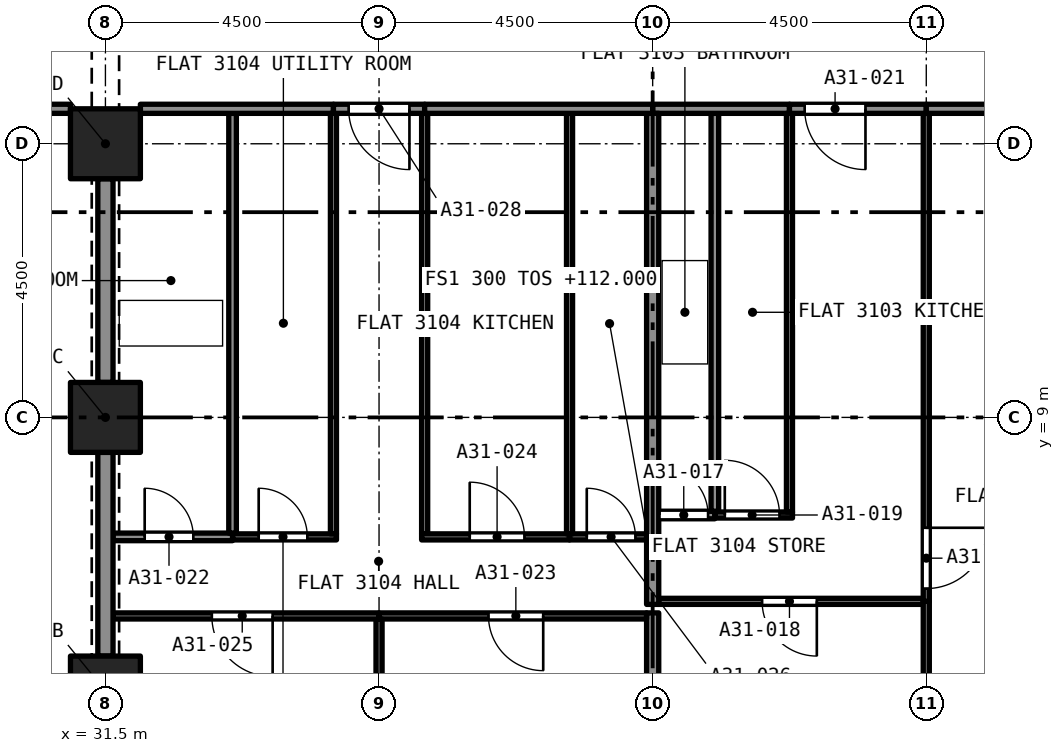
"""IFC4 building model, lengths in metres.
Left out: names, types, materials, properties, quantities, classifications, styles, units other than length and angle.
Written with IfcOpenShell. Run it as: python <this file> out.ifc"""

import sys

from ifc_helpers import new_model, si_unit, direction, frame, frame_2d, origin, origin_2d, place, context, subcontext, project, spatial, rectangle, extrude, element, fill, save


model = new_model("IFC4")
c1 = context("Model", 3, precision=1e-05, world=origin(), true_north=direction((0.0, 1.0)))
c2 = subcontext(c1, "Body", "Model", "MODEL_VIEW")
j1 = project(units=[si_unit("LENGTHUNIT", "METRE"), si_unit("PLANEANGLEUNIT", "RADIAN")], contexts=[c1])
p1 = place(None, origin())
s1 = spatial("IfcSite", under=j1, at=p1, CompositionType="ELEMENT")
p2 = place(p1, origin())
s2 = spatial("IfcBuilding", under=s1, at=p2, CompositionType="ELEMENT")
p3 = place(p2, frame((0.0, 0.0, 112.0)))
s3 = spatial("IfcBuildingStorey", under=s2, at=p3, CompositionType="ELEMENT", Elevation=112.0)
for number, where, z_axis, x_axis in (
    (1, (31.5, 4.5, 0.0), (0.0, 0.0, 1.0), (1.0, 0.0, 0.0)),
    (2, (31.5, 9.0, 0.0), (0.0, 0.0, 1.0), (1.0, 0.0, 0.0)),
    (3, (31.5, 13.5, 0.0), (0.0, 0.0, 1.0), (1.0, 0.0, 0.0)),
):
    element("IfcColumn", number, at=place(p3, frame(where, z_axis=z_axis, x_axis=x_axis)), inside=s3, PredefinedType="COLUMN", context=c2, shape_type="SweptSolid", body=[
        extrude(rectangle(XDim=1.15, YDim=1.15, at=origin_2d()), origin(), (0.0, 0.0, 1.0), 3.2),
    ])
p4 = place(p3, frame((40.6, 7.395, 0.0), z_axis=(0.0, 0.0, 1.0), x_axis=(1.0, 0.0, 0.0)))
e4 = element("IfcWall", 4, at=p4, inside=s3, PredefinedType="PARTITIONING", context=c2, shape_type="SweptSolid", body=[
    extrude(rectangle(XDim=0.923, YDim=0.125, at=frame_2d((0.461, 0.0))), origin(), (0.0, 0.0, 1.0), 2.9),
])
p5 = place(p4, frame((0.011, 0.0, 0.0)))
e5 = element("IfcOpeningElement", 5, at=p5, cuts=e4, PredefinedType="OPENING", context=c2, shape_type="SweptSolid", body=[
    extrude(rectangle(XDim=0.8, YDim=2.1, at=frame_2d((0.4, 1.05))), frame((0.0, 0.073, 0.0), z_axis=(0.0, -1.0, 0.0), x_axis=(1.0, 0.0, 0.0)), (0.0, 0.0, 1.0), 0.145),
])
p6 = place(p3, frame((41.523, 7.458, 0.0), z_axis=(0.0, 0.0, 1.0), x_axis=(0.0, 1.0, 0.0)))
e6 = element("IfcWall", 6, at=p6, inside=s3, PredefinedType="PARTITIONING", context=c2, shape_type="SweptSolid", body=[
    extrude(rectangle(XDim=6.542, YDim=0.125, at=frame_2d((3.271, 0.0))), origin(), (0.0, 0.0, 1.0), 2.9),
])
p7 = place(p3, frame((40.5, 14.075, 0.0), z_axis=(0.0, 0.0, 1.0), x_axis=(1.0, 0.0, 0.0)))
e7 = element("IfcWall", 7, at=p7, inside=s3, PredefinedType="PARTITIONING", context=c2, shape_type="SweptSolid", body=[
    extrude(rectangle(XDim=2.25, YDim=0.15, at=frame_2d((1.125, 0.0))), origin(), (0.0, 0.0, 1.0), 2.9),
])
p8 = place(p3, frame((44.95, 5.975, 0.0), z_axis=(0.0, 0.0, 1.0), x_axis=(-1.0, 0.0, 0.0)))
e8 = element("IfcWall", 8, at=p8, inside=s3, PredefinedType="PARTITIONING", context=c2, shape_type="SweptSolid", body=[
    extrude(rectangle(XDim=4.35, YDim=0.1, at=frame_2d((2.175, 0.0))), origin(), (0.0, 0.0, 1.0), 2.9),
])
p9 = place(p8, frame((1.75, 0.0, 0.0)))
e9 = element("IfcOpeningElement", 9, at=p9, cuts=e8, PredefinedType="OPENING", context=c2, shape_type="SweptSolid", body=[
    extrude(rectangle(XDim=0.9, YDim=2.1, at=frame_2d((0.45, 1.05))), frame((0.0, 0.06, 0.0), z_axis=(0.0, -1.0, 0.0), x_axis=(1.0, 0.0, 0.0)), (0.0, 0.0, 1.0), 0.12),
])
p10 = place(p3, frame((45.0, 0.622, 0.0), z_axis=(0.0, 0.0, 1.0), x_axis=(0.0, 1.0, 0.0)))
e10 = element("IfcWall", 10, at=p10, inside=s3, PredefinedType="PARTITIONING", context=c2, shape_type="SweptSolid", body=[
    extrude(rectangle(XDim=5.353, YDim=0.1, at=frame_2d((2.676, 0.0))), origin(), (0.0, 0.0, 1.0), 2.9),
])
p11 = place(p3, frame((40.5, 0.575, 0.0), z_axis=(0.0, 0.0, 1.0), x_axis=(0.0, 1.0, 0.0)))
e11 = element("IfcWall", 11, at=p11, inside=s3, PredefinedType="PARTITIONING", context=c2, shape_type="SweptSolid", body=[
    extrude(rectangle(XDim=5.21, YDim=0.2, at=frame_2d((2.605, 0.0))), origin(), (0.0, 0.0, 1.0), 2.9),
])
p12 = place(p3, frame((41.523, 7.395, 0.0), z_axis=(0.0, 0.0, 1.0), x_axis=(1.0, 0.0, 0.0)))
e12 = element("IfcWall", 12, at=p12, inside=s3, PredefinedType="PARTITIONING", context=c2, shape_type="SweptSolid", body=[
    extrude(rectangle(XDim=1.277, YDim=0.1, at=frame_2d((0.639, 0.0))), origin(), (0.0, 0.0, 1.0), 2.9),
])
p13 = place(p12, frame((0.164, 0.0, 0.0)))
e13 = element("IfcOpeningElement", 13, at=p13, cuts=e12, PredefinedType="OPENING", context=c2, shape_type="SweptSolid", body=[
    extrude(rectangle(XDim=0.9, YDim=2.1, at=frame_2d((0.45, 1.05))), frame((0.0, 0.06, 0.0), z_axis=(0.0, -1.0, 0.0), x_axis=(1.0, 0.0, 0.0)), (0.0, 0.0, 1.0), 0.12),
])
p14 = place(p3, frame((42.75, 7.445, 0.0), z_axis=(0.0, 0.0, 1.0), x_axis=(0.0, 1.0, 0.0)))
e14 = element("IfcWall", 14, at=p14, inside=s3, PredefinedType="PARTITIONING", context=c2, shape_type="SweptSolid", body=[
    extrude(rectangle(XDim=6.555, YDim=0.1, at=frame_2d((3.277, 0.0))), origin(), (0.0, 0.0, 1.0), 2.9),
])
p15 = place(p3, frame((45.0, 14.0, 0.0), z_axis=(0.0, 0.0, 1.0), x_axis=(0.0, -1.0, 0.0)))
e15 = element("IfcWall", 15, at=p15, inside=s3, PredefinedType="PARTITIONING", context=c2, shape_type="SweptSolid", body=[
    extrude(rectangle(XDim=8.025, YDim=0.1, at=frame_2d((4.012, 0.0))), origin(), (0.0, 0.0, 1.0), 2.9),
])
p16 = place(p15, frame((6.815, 0.0, 0.0)))
e16 = element("IfcOpeningElement", 16, at=p16, cuts=e15, PredefinedType="OPENING", context=c2, shape_type="SweptSolid", body=[
    extrude(rectangle(XDim=1.0, YDim=2.1, at=frame_2d((0.5, 1.05))), frame((0.0, 0.06, 0.0), z_axis=(0.0, -1.0, 0.0), x_axis=(1.0, 0.0, 0.0)), (0.0, 0.0, 1.0), 0.12),
])
p17 = place(p3, frame((40.5, 5.925, 0.0), z_axis=(0.0, 0.0, 1.0), x_axis=(0.0, 1.0, 0.0)))
e17 = element("IfcWall", 17, at=p17, inside=s3, PredefinedType="PARTITIONING", context=c2, shape_type="SweptSolid", body=[
    extrude(rectangle(XDim=8.075, YDim=0.2, at=frame_2d((4.038, 0.0))), origin(), (0.0, 0.0, 1.0), 2.9),
])
p18 = place(p3, frame((45.0, 14.075, 0.0), z_axis=(0.0, 0.0, 1.0), x_axis=(-1.0, 0.0, 0.0)))
e18 = element("IfcWall", 18, at=p18, inside=s3, PredefinedType="PARTITIONING", context=c2, shape_type="SweptSolid", body=[
    extrude(rectangle(XDim=2.25, YDim=0.15, at=frame_2d((1.125, 0.0))), origin(), (0.0, 0.0, 1.0), 2.9),
])
p19 = place(p18, frame((1.0, 0.0, 0.0)))
e19 = element("IfcOpeningElement", 19, at=p19, cuts=e18, PredefinedType="OPENING", context=c2, shape_type="SweptSolid", body=[
    extrude(rectangle(XDim=1.0, YDim=2.1, at=frame_2d((0.5, 1.05))), frame((0.0, 0.085, 0.0), z_axis=(0.0, -1.0, 0.0), x_axis=(1.0, 0.0, 0.0)), (0.0, 0.0, 1.0), 0.17),
])
p20 = place(p3, frame((45.0, 14.075, 0.0), z_axis=(0.0, 0.0, 1.0), x_axis=(1.0, 0.0, 0.0)))
e20 = element("IfcWall", 20, at=p20, inside=s3, PredefinedType="PARTITIONING", context=c2, shape_type="SweptSolid", body=[
    extrude(rectangle(XDim=3.925, YDim=0.15, at=frame_2d((1.962, 0.0))), origin(), (0.0, 0.0, 1.0), 2.9),
])
p21 = place(p3, frame((31.625, 7.035, 0.0), z_axis=(0.0, 0.0, 1.0), x_axis=(1.0, 0.0, 0.0)))
e21 = element("IfcWall", 21, at=p21, inside=s3, PredefinedType="PARTITIONING", context=c2, shape_type="SweptSolid", body=[
    extrude(rectangle(XDim=1.966, YDim=0.125, at=frame_2d((0.983, 0.0))), origin(), (0.0, 0.0, 1.0), 2.9),
])
p22 = place(p21, frame((0.521, 0.0, 0.0)))
e22 = element("IfcOpeningElement", 22, at=p22, cuts=e21, PredefinedType="OPENING", context=c2, shape_type="SweptSolid", body=[
    extrude(rectangle(XDim=0.8, YDim=2.1, at=frame_2d((0.4, 1.05))), frame((0.0, 0.073, 0.0), z_axis=(0.0, -1.0, 0.0), x_axis=(1.0, 0.0, 0.0)), (0.0, 0.0, 1.0), 0.145),
])
p23 = place(p3, frame((33.591, 7.097, 0.0), z_axis=(0.0, 0.0, 1.0), x_axis=(0.0, 1.0, 0.0)))
e23 = element("IfcWall", 23, at=p23, inside=s3, PredefinedType="PARTITIONING", context=c2, shape_type="SweptSolid", body=[
    extrude(rectangle(XDim=6.903, YDim=0.125, at=frame_2d((3.451, 0.0))), origin(), (0.0, 0.0, 1.0), 2.9),
])
p24 = place(p3, frame((31.5, 9.575, 0.0), z_axis=(0.0, 0.0, 1.0), x_axis=(0.0, 1.0, 0.0)))
e24 = element("IfcWall", 24, at=p24, inside=s3, PredefinedType="PARTITIONING", context=c2, shape_type="SweptSolid", body=[
    extrude(rectangle(XDim=3.35, YDim=0.25, at=frame_2d((1.675, 0.0))), origin(), (0.0, 0.0, 1.0), 2.38),
])
p25 = place(p3, frame((32.075, 14.075, 0.0), z_axis=(0.0, 0.0, 1.0), x_axis=(1.0, 0.0, 0.0)))
e25 = element("IfcWall", 25, at=p25, inside=s3, PredefinedType="PARTITIONING", context=c2, shape_type="SweptSolid", body=[
    extrude(rectangle(XDim=3.175, YDim=0.15, at=frame_2d((1.587, 0.0))), origin(), (0.0, 0.0, 1.0), 2.9),
])
p26 = place(p3, frame((40.4, 5.735, 0.0), z_axis=(0.0, 0.0, 1.0), x_axis=(-1.0, 0.0, 0.0)))
e26 = element("IfcWall", 26, at=p26, inside=s3, PredefinedType="PARTITIONING", context=c2, shape_type="SweptSolid", body=[
    extrude(rectangle(XDim=4.4, YDim=0.1, at=frame_2d((2.2, 0.0))), origin(), (0.0, 0.0, 1.0), 2.9),
])
p27 = place(p26, frame((1.7, 0.0, 0.0)))
e27 = element("IfcOpeningElement", 27, at=p27, cuts=e26, PredefinedType="OPENING", context=c2, shape_type="SweptSolid", body=[
    extrude(rectangle(XDim=0.9, YDim=2.1, at=frame_2d((0.45, 1.05))), frame((0.0, 0.06, 0.0), z_axis=(0.0, -1.0, 0.0), x_axis=(1.0, 0.0, 0.0)), (0.0, 0.0, 1.0), 0.12),
])
p28 = place(p3, frame((36.0, 0.575, 0.0), z_axis=(0.0, 0.0, 1.0), x_axis=(0.0, 1.0, 0.0)))
e28 = element("IfcWall", 28, at=p28, inside=s3, PredefinedType="PARTITIONING", context=c2, shape_type="SweptSolid", body=[
    extrude(rectangle(XDim=5.11, YDim=0.1, at=frame_2d((2.555, 0.0))), origin(), (0.0, 0.0, 1.0), 2.9),
])
p29 = place(p3, frame((36.75, 7.085, 0.0), z_axis=(0.0, 0.0, 1.0), x_axis=(0.0, 1.0, 0.0)))
e29 = element("IfcWall", 29, at=p29, inside=s3, PredefinedType="PARTITIONING", context=c2, shape_type="SweptSolid", body=[
    extrude(rectangle(XDim=6.915, YDim=0.1, at=frame_2d((3.458, 0.0))), origin(), (0.0, 0.0, 1.0), 2.9),
])
p30 = place(p3, frame((36.7, 7.035, 0.0), z_axis=(0.0, 0.0, 1.0), x_axis=(1.0, 0.0, 0.0)))
e30 = element("IfcWall", 30, at=p30, inside=s3, PredefinedType="PARTITIONING", context=c2, shape_type="SweptSolid", body=[
    extrude(rectangle(XDim=2.433, YDim=0.1, at=frame_2d((1.216, 0.0))), origin(), (0.0, 0.0, 1.0), 2.9),
])
p31 = place(p30, frame((0.792, 0.0, 0.0)))
e31 = element("IfcOpeningElement", 31, at=p31, cuts=e30, PredefinedType="OPENING", context=c2, shape_type="SweptSolid", body=[
    extrude(rectangle(XDim=0.9, YDim=2.1, at=frame_2d((0.45, 1.05))), frame((0.0, 0.06, 0.0), z_axis=(0.0, -1.0, 0.0), x_axis=(1.0, 0.0, 0.0)), (0.0, 0.0, 1.0), 0.12),
])
p32 = place(p3, frame((36.0, 5.735, 0.0), z_axis=(0.0, 0.0, 1.0), x_axis=(-1.0, 0.0, 0.0)))
e32 = element("IfcWall", 32, at=p32, inside=s3, PredefinedType="PARTITIONING", context=c2, shape_type="SweptSolid", body=[
    extrude(rectangle(XDim=4.375, YDim=0.1, at=frame_2d((2.188, 0.0))), origin(), (0.0, 0.0, 1.0), 2.9),
])
p33 = place(p32, frame((1.75, 0.0, 0.0)))
e33 = element("IfcOpeningElement", 33, at=p33, cuts=e32, PredefinedType="OPENING", context=c2, shape_type="SweptSolid", body=[
    extrude(rectangle(XDim=1.0, YDim=2.1, at=frame_2d((0.5, 1.05))), frame((0.0, 0.06, 0.0), z_axis=(0.0, -1.0, 0.0), x_axis=(1.0, 0.0, 0.0)), (0.0, 0.0, 1.0), 0.12),
])
p34 = place(p3, frame((39.133, 7.035, 0.0), z_axis=(0.0, 0.0, 1.0), x_axis=(1.0, 0.0, 0.0)))
e34 = element("IfcWall", 34, at=p34, inside=s3, PredefinedType="PARTITIONING", context=c2, shape_type="SweptSolid", body=[
    extrude(rectangle(XDim=1.267, YDim=0.1, at=frame_2d((0.634, 0.0))), origin(), (0.0, 0.0, 1.0), 2.9),
])
p35 = place(p34, frame((0.284, 0.0, 0.0)))
e35 = element("IfcOpeningElement", 35, at=p35, cuts=e34, PredefinedType="OPENING", context=c2, shape_type="SweptSolid", body=[
    extrude(rectangle(XDim=0.8, YDim=2.1, at=frame_2d((0.4, 1.05))), frame((0.0, 0.06, 0.0), z_axis=(0.0, -1.0, 0.0), x_axis=(1.0, 0.0, 0.0)), (0.0, 0.0, 1.0), 0.12),
])
p36 = place(p3, frame((33.591, 7.035, 0.0), z_axis=(0.0, 0.0, 1.0), x_axis=(1.0, 0.0, 0.0)))
e36 = element("IfcWall", 36, at=p36, inside=s3, PredefinedType="PARTITIONING", context=c2, shape_type="SweptSolid", body=[
    extrude(rectangle(XDim=1.709, YDim=0.1, at=frame_2d((0.854, 0.0))), origin(), (0.0, 0.0, 1.0), 2.9),
])
p37 = place(p36, frame((0.429, 0.0, 0.0)))
e37 = element("IfcOpeningElement", 37, at=p37, cuts=e36, PredefinedType="OPENING", context=c2, shape_type="SweptSolid", body=[
    extrude(rectangle(XDim=0.8, YDim=2.1, at=frame_2d((0.4, 1.05))), frame((0.0, 0.06, 0.0), z_axis=(0.0, -1.0, 0.0), x_axis=(1.0, 0.0, 0.0)), (0.0, 0.0, 1.0), 0.12),
])
p38 = place(p3, frame((35.25, 7.085, 0.0), z_axis=(0.0, 0.0, 1.0), x_axis=(0.0, 1.0, 0.0)))
e38 = element("IfcWall", 38, at=p38, inside=s3, PredefinedType="PARTITIONING", context=c2, shape_type="SweptSolid", body=[
    extrude(rectangle(XDim=6.915, YDim=0.1, at=frame_2d((3.458, 0.0))), origin(), (0.0, 0.0, 1.0), 2.9),
])
p39 = place(p3, frame((36.75, 14.075, 0.0), z_axis=(0.0, 0.0, 1.0), x_axis=(-1.0, 0.0, 0.0)))
e39 = element("IfcWall", 39, at=p39, inside=s3, PredefinedType="PARTITIONING", context=c2, shape_type="SweptSolid", body=[
    extrude(rectangle(XDim=1.5, YDim=0.15, at=frame_2d((0.75, 0.0))), origin(), (0.0, 0.0, 1.0), 2.9),
])
p40 = place(p39, frame((0.25, 0.0, 0.0)))
e40 = element("IfcOpeningElement", 40, at=p40, cuts=e39, PredefinedType="OPENING", context=c2, shape_type="SweptSolid", body=[
    extrude(rectangle(XDim=1.0, YDim=2.1, at=frame_2d((0.5, 1.05))), frame((0.0, 0.085, 0.0), z_axis=(0.0, -1.0, 0.0), x_axis=(1.0, 0.0, 0.0)), (0.0, 0.0, 1.0), 0.17),
])
p41 = place(p3, frame((39.133, 7.085, 0.0), z_axis=(0.0, 0.0, 1.0), x_axis=(0.0, 1.0, 0.0)))
e41 = element("IfcWall", 41, at=p41, inside=s3, PredefinedType="PARTITIONING", context=c2, shape_type="SweptSolid", body=[
    extrude(rectangle(XDim=6.915, YDim=0.1, at=frame_2d((3.458, 0.0))), origin(), (0.0, 0.0, 1.0), 2.9),
])
p42 = place(p3, frame((36.75, 14.075, 0.0), z_axis=(0.0, 0.0, 1.0), x_axis=(1.0, 0.0, 0.0)))
e42 = element("IfcWall", 42, at=p42, inside=s3, PredefinedType="PARTITIONING", context=c2, shape_type="SweptSolid", body=[
    extrude(rectangle(XDim=3.75, YDim=0.15, at=frame_2d((1.875, 0.0))), origin(), (0.0, 0.0, 1.0), 2.9),
])
p43 = place(p3, frame((31.5, 5.075, 0.0), z_axis=(0.0, 0.0, 1.0), x_axis=(0.0, 1.0, 0.0)))
e43 = element("IfcWall", 43, at=p43, inside=s3, PredefinedType="PARTITIONING", context=c2, shape_type="SweptSolid", body=[
    extrude(rectangle(XDim=3.35, YDim=0.25, at=frame_2d((1.675, 0.0))), origin(), (0.0, 0.0, 1.0), 2.38),
])
p44 = place(p3, frame((30.925, 14.075, 0.0), z_axis=(0.0, 0.0, 1.0), x_axis=(-1.0, 0.0, 0.0)))
e44 = element("IfcWall", 44, at=p44, inside=s3, PredefinedType="PARTITIONING", context=c2, shape_type="SweptSolid", body=[
    extrude(rectangle(XDim=8.425, YDim=0.15, at=frame_2d((4.212, 0.0))), origin(), (0.0, 0.0, 1.0), 2.75),
])
p45 = place(p44, frame((3.425, 0.0, 0.0)))
e45 = element("IfcOpeningElement", 45, at=p45, cuts=e44, PredefinedType="OPENING", context=c2, shape_type="SweptSolid", body=[
    extrude(rectangle(XDim=1.0, YDim=2.1, at=frame_2d((0.5, 1.05))), frame((0.0, 0.085, 0.0), z_axis=(0.0, -1.0, 0.0), x_axis=(1.0, 0.0, 0.0)), (0.0, 0.0, 1.0), 0.17),
])
p46 = place(p5, origin())
e46 = element("IfcDoor", 46, at=p46, inside=s3, OperationType="SINGLE_SWING_LEFT", PredefinedType="DOOR", context=c2, shape_type="SweptSolid", body=[
    extrude(rectangle(XDim=0.8, YDim=2.1, at=frame_2d((0.4, 1.05))), frame((0.0, 0.025, 0.0), z_axis=(0.0, -1.0, 0.0), x_axis=(1.0, 0.0, 0.0)), (0.0, 0.0, 1.0), 0.05),
])
fill(e5, e46)
p47 = place(p9, origin())
e47 = element("IfcDoor", 47, at=p47, inside=s3, OperationType="SINGLE_SWING_RIGHT", PredefinedType="DOOR", context=c2, shape_type="SweptSolid", body=[
    extrude(rectangle(XDim=0.9, YDim=2.1, at=frame_2d((0.45, 1.05))), frame((0.0, 0.025, 0.0), z_axis=(0.0, -1.0, 0.0), x_axis=(1.0, 0.0, 0.0)), (0.0, 0.0, 1.0), 0.05),
])
fill(e9, e47)
p48 = place(p13, origin())
e48 = element("IfcDoor", 48, at=p48, inside=s3, OperationType="SINGLE_SWING_LEFT", PredefinedType="DOOR", context=c2, shape_type="SweptSolid", body=[
    extrude(rectangle(XDim=0.9, YDim=2.1, at=frame_2d((0.45, 1.05))), frame((0.0, 0.025, 0.0), z_axis=(0.0, -1.0, 0.0), x_axis=(1.0, 0.0, 0.0)), (0.0, 0.0, 1.0), 0.05),
])
fill(e13, e48)
p49 = place(p16, origin())
e49 = element("IfcDoor", 49, at=p49, inside=s3, OperationType="SINGLE_SWING_RIGHT", PredefinedType="DOOR", context=c2, shape_type="SweptSolid", body=[
    extrude(rectangle(XDim=1.0, YDim=2.1, at=frame_2d((0.5, 1.05))), frame((0.0, 0.025, 0.0), z_axis=(0.0, -1.0, 0.0), x_axis=(1.0, 0.0, 0.0)), (0.0, 0.0, 1.0), 0.05),
])
fill(e16, e49)
p50 = place(p19, origin())
e50 = element("IfcDoor", 50, at=p50, inside=s3, OperationType="SINGLE_SWING_RIGHT", PredefinedType="DOOR", context=c2, shape_type="SweptSolid", body=[
    extrude(rectangle(XDim=1.0, YDim=2.1, at=frame_2d((0.5, 1.05))), frame((0.0, 0.025, 0.0), z_axis=(0.0, -1.0, 0.0), x_axis=(1.0, 0.0, 0.0)), (0.0, 0.0, 1.0), 0.05),
])
fill(e19, e50)
p51 = place(p22, origin())
e51 = element("IfcDoor", 51, at=p51, inside=s3, OperationType="SINGLE_SWING_LEFT", PredefinedType="DOOR", context=c2, shape_type="SweptSolid", body=[
    extrude(rectangle(XDim=0.8, YDim=2.1, at=frame_2d((0.4, 1.05))), frame((0.0, 0.025, 0.0), z_axis=(0.0, -1.0, 0.0), x_axis=(1.0, 0.0, 0.0)), (0.0, 0.0, 1.0), 0.05),
])
fill(e22, e51)
p52 = place(p27, origin())
e52 = element("IfcDoor", 52, at=p52, inside=s3, OperationType="SINGLE_SWING_LEFT", PredefinedType="DOOR", context=c2, shape_type="SweptSolid", body=[
    extrude(rectangle(XDim=0.9, YDim=2.1, at=frame_2d((0.45, 1.05))), frame((0.0, 0.025, 0.0), z_axis=(0.0, -1.0, 0.0), x_axis=(1.0, 0.0, 0.0)), (0.0, 0.0, 1.0), 0.05),
])
fill(e27, e52)
p53 = place(p31, origin())
e53 = element("IfcDoor", 53, at=p53, inside=s3, OperationType="SINGLE_SWING_RIGHT", PredefinedType="DOOR", context=c2, shape_type="SweptSolid", body=[
    extrude(rectangle(XDim=0.9, YDim=2.1, at=frame_2d((0.45, 1.05))), frame((0.0, 0.025, 0.0), z_axis=(0.0, -1.0, 0.0), x_axis=(1.0, 0.0, 0.0)), (0.0, 0.0, 1.0), 0.05),
])
fill(e31, e53)
p54 = place(p33, origin())
e54 = element("IfcDoor", 54, at=p54, inside=s3, OperationType="SINGLE_SWING_RIGHT", PredefinedType="DOOR", context=c2, shape_type="SweptSolid", body=[
    extrude(rectangle(XDim=1.0, YDim=2.1, at=frame_2d((0.5, 1.05))), frame((0.0, 0.025, 0.0), z_axis=(0.0, -1.0, 0.0), x_axis=(1.0, 0.0, 0.0)), (0.0, 0.0, 1.0), 0.05),
])
fill(e33, e54)
p55 = place(p35, origin())
e55 = element("IfcDoor", 55, at=p55, inside=s3, OperationType="SINGLE_SWING_RIGHT", PredefinedType="DOOR", context=c2, shape_type="SweptSolid", body=[
    extrude(rectangle(XDim=0.8, YDim=2.1, at=frame_2d((0.4, 1.05))), frame((0.0, 0.025, 0.0), z_axis=(0.0, -1.0, 0.0), x_axis=(1.0, 0.0, 0.0)), (0.0, 0.0, 1.0), 0.05),
])
fill(e35, e55)
p56 = place(p37, origin())
e56 = element("IfcDoor", 56, at=p56, inside=s3, OperationType="SINGLE_SWING_LEFT", PredefinedType="DOOR", context=c2, shape_type="SweptSolid", body=[
    extrude(rectangle(XDim=0.8, YDim=2.1, at=frame_2d((0.4, 1.05))), frame((0.0, 0.025, 0.0), z_axis=(0.0, -1.0, 0.0), x_axis=(1.0, 0.0, 0.0)), (0.0, 0.0, 1.0), 0.05),
])
fill(e37, e56)
p57 = place(p40, origin())
e57 = element("IfcDoor", 57, at=p57, inside=s3, OperationType="SINGLE_SWING_RIGHT", PredefinedType="DOOR", context=c2, shape_type="SweptSolid", body=[
    extrude(rectangle(XDim=1.0, YDim=2.1, at=frame_2d((0.5, 1.05))), frame((0.0, 0.025, 0.0), z_axis=(0.0, -1.0, 0.0), x_axis=(1.0, 0.0, 0.0)), (0.0, 0.0, 1.0), 0.05),
])
fill(e40, e57)
save(model, sys.argv[1])
